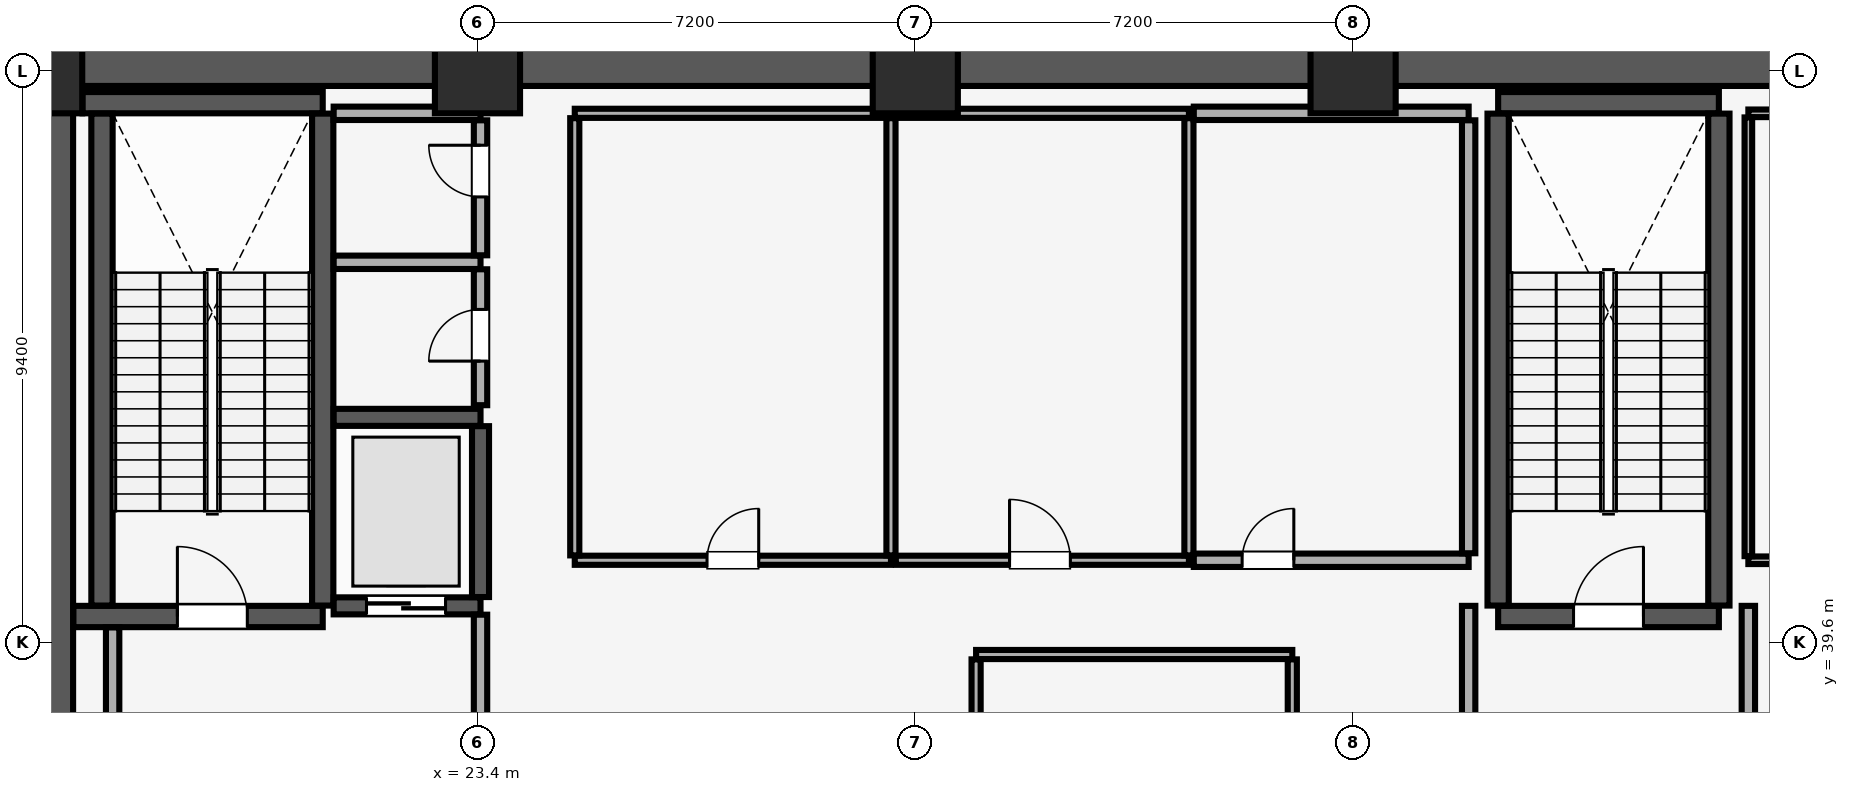
"""IFC4 building model, lengths in metres.
Left out: names, types, materials, properties, quantities, classifications, styles, units other than length and angle.
Written with IfcOpenShell. Run it as: python <this file> out.ifc"""

import sys

from ifc_helpers import new_model, si_unit, direction, frame, frame_2d, origin, origin_2d, place, context, subcontext, project, spatial, rectangle, extrude, element, fill, save


model = new_model("IFC4")
c1 = context("Model", 3, precision=1e-05, world=origin(), true_north=direction((0.0, 1.0)))
c2 = subcontext(c1, "Body", "Model", "MODEL_VIEW")
j1 = project(units=[si_unit("LENGTHUNIT", "METRE"), si_unit("PLANEANGLEUNIT", "RADIAN")], contexts=[c1])
p1 = place(None, origin())
s1 = spatial("IfcSite", under=j1, at=p1, CompositionType="ELEMENT")
p2 = place(p1, origin())
s2 = spatial("IfcBuilding", under=s1, at=p2, CompositionType="ELEMENT")
p3 = place(p2, frame((0.0, 0.0, 26.0)))
s3 = spatial("IfcBuildingStorey", under=s2, at=p3, CompositionType="ELEMENT", Elevation=26.0)
for number, where, z_axis, x_axis in (
    (1, (16.2, 49.0, 0.0), (0.0, 0.0, 1.0), (1.0, 0.0, 0.0)),
    (2, (23.4, 49.0, 0.0), (0.0, 0.0, 1.0), (1.0, 0.0, 0.0)),
    (3, (30.6, 49.0, 0.0), (0.0, 0.0, 1.0), (1.0, 0.0, 0.0)),
    (4, (37.8, 49.0, 0.0), (0.0, 0.0, 1.0), (1.0, 0.0, 0.0)),
):
    element("IfcColumn", number, at=place(p3, frame(where, z_axis=z_axis, x_axis=x_axis)), inside=s3, PredefinedType="COLUMN", context=c2, shape_type="SweptSolid", body=[
        extrude(rectangle(XDim=1.4, YDim=1.4, at=origin_2d()), origin(), (0.0, 0.0, 1.0), 5.16),
    ])
p4 = place(p3, frame((16.2, 49.3, 0.0), z_axis=(0.0, 0.0, 1.0), x_axis=(1.0, 0.0, 0.0)))
e5 = element("IfcWall", 5, at=p4, inside=s3, PredefinedType="SHEAR", context=c2, shape_type="SweptSolid", body=[
    extrude(rectangle(XDim=51.6, YDim=1.1, at=frame_2d((25.8, 0.0))), origin(), (0.0, 0.0, 1.0), 5.12),
])
p5 = place(p3, frame((16.2, 29.4, 0.0), z_axis=(0.0, 0.0, 1.0), x_axis=(0.0, 1.0, 0.0)))
e6 = element("IfcWall", 6, at=p5, inside=s3, PredefinedType="SHEAR", context=c2, shape_type="SweptSolid", body=[
    extrude(rectangle(XDim=19.2, YDim=1.1, at=frame_2d((9.6, 0.0))), origin(), (0.0, 0.0, 1.0), 5.12),
])
p6 = place(p3, frame((16.755, 40.025, 0.0), z_axis=(0.0, 0.0, 1.0), x_axis=(1.0, 0.0, 0.0)))
e7 = element("IfcWall", 7, at=p6, inside=s3, PredefinedType="SHEAR", context=c2, shape_type="SweptSolid", body=[
    extrude(rectangle(XDim=4.1, YDim=0.35, at=frame_2d((2.05, 0.0))), origin(), (0.0, 0.0, 1.0), 5.12),
])
p7 = place(p6, frame((1.71, 0.0, 0.0)))
e8 = element("IfcOpeningElement", 8, at=p7, cuts=e7, PredefinedType="OPENING", context=c2, shape_type="SweptSolid", body=[
    extrude(rectangle(XDim=1.15, YDim=2.15, at=frame_2d((0.575, 1.075))), frame((0.0, 0.185, 0.0), z_axis=(0.0, -1.0, 0.0), x_axis=(1.0, 0.0, 0.0)), (0.0, 0.0, 1.0), 0.37),
])
p8 = place(p3, frame((16.905, 48.475, 0.0), z_axis=(0.0, 0.0, 1.0), x_axis=(1.0, 0.0, 0.0)))
e9 = element("IfcWall", 9, at=p8, inside=s3, PredefinedType="SHEAR", context=c2, shape_type="SweptSolid", body=[
    extrude(rectangle(XDim=3.95, YDim=0.35, at=frame_2d((1.975, 0.0))), origin(), (0.0, 0.0, 1.0), 5.12),
])
for number, where, z_axis, x_axis in (
    (10, (17.225, 40.205, 0.0), (0.0, 0.0, 1.0), (0.0, 1.0, 0.0)),
    (11, (20.855, 40.205, 0.0), (0.0, 0.0, 1.0), (0.0, 1.0, 0.0)),
):
    element("IfcWall", number, at=place(p3, frame(where, z_axis=z_axis, x_axis=x_axis)), inside=s3, PredefinedType="SHEAR", context=c2, shape_type="SweptSolid", body=[
        extrude(rectangle(XDim=8.09, YDim=0.35, at=frame_2d((4.045, 0.0))), origin(), (0.0, 0.0, 1.0), 5.12),
    ])
p9 = place(p3, frame((40.185, 40.025, 0.0), z_axis=(0.0, 0.0, 1.0), x_axis=(1.0, 0.0, 0.0)))
e12 = element("IfcWall", 12, at=p9, inside=s3, PredefinedType="SHEAR", context=c2, shape_type="SweptSolid", body=[
    extrude(rectangle(XDim=3.63, YDim=0.35, at=frame_2d((1.815, 0.0))), origin(), (0.0, 0.0, 1.0), 5.12),
])
p10 = place(p9, frame((1.24, 0.0, 0.0)))
e13 = element("IfcOpeningElement", 13, at=p10, cuts=e12, PredefinedType="OPENING", context=c2, shape_type="SweptSolid", body=[
    extrude(rectangle(XDim=1.15, YDim=2.15, at=frame_2d((0.575, 1.075))), frame((0.0, 0.185, 0.0), z_axis=(0.0, -1.0, 0.0), x_axis=(1.0, 0.0, 0.0)), (0.0, 0.0, 1.0), 0.37),
])
p11 = place(p3, frame((40.185, 48.475, 0.0), z_axis=(0.0, 0.0, 1.0), x_axis=(1.0, 0.0, 0.0)))
e14 = element("IfcWall", 14, at=p11, inside=s3, PredefinedType="SHEAR", context=c2, shape_type="SweptSolid", body=[
    extrude(rectangle(XDim=3.63, YDim=0.35, at=frame_2d((1.815, 0.0))), origin(), (0.0, 0.0, 1.0), 5.12),
])
for number, where, z_axis, x_axis in (
    (15, (40.185, 40.205, 0.0), (0.0, 0.0, 1.0), (0.0, 1.0, 0.0)),
    (16, (43.815, 40.205, 0.0), (0.0, 0.0, 1.0), (0.0, 1.0, 0.0)),
):
    element("IfcWall", number, at=place(p3, frame(where, z_axis=z_axis, x_axis=x_axis)), inside=s3, PredefinedType="SHEAR", context=c2, shape_type="SweptSolid", body=[
        extrude(rectangle(XDim=8.09, YDim=0.35, at=frame_2d((4.045, 0.0))), origin(), (0.0, 0.0, 1.0), 5.12),
    ])
p12 = place(p3, frame((21.035, 40.2, 0.0), z_axis=(0.0, 0.0, 1.0), x_axis=(1.0, 0.0, 0.0)))
e17 = element("IfcWall", 17, at=p12, inside=s3, PredefinedType="SHEAR", context=c2, shape_type="SweptSolid", body=[
    extrude(rectangle(XDim=2.415, YDim=0.28, at=frame_2d((1.208, 0.0))), origin(), (0.0, 0.0, 1.0), 5.12),
])
p13 = place(p12, frame((0.54, 0.0, 0.0)))
e18 = element("IfcOpeningElement", 18, at=p13, cuts=e17, PredefinedType="OPENING", context=c2, shape_type="SweptSolid", body=[
    extrude(rectangle(XDim=1.3, YDim=2.3, at=frame_2d((0.65, 1.15))), frame((0.0, 0.15, 0.0), z_axis=(0.0, -1.0, 0.0), x_axis=(1.0, 0.0, 0.0)), (0.0, 0.0, 1.0), 0.3),
])
p14 = place(p3, frame((21.035, 43.3, 0.0), z_axis=(0.0, 0.0, 1.0), x_axis=(1.0, 0.0, 0.0)))
e19 = element("IfcWall", 19, at=p14, inside=s3, PredefinedType="SHEAR", context=c2, shape_type="SweptSolid", body=[
    extrude(rectangle(XDim=2.415, YDim=0.28, at=frame_2d((1.208, 0.0))), origin(), (0.0, 0.0, 1.0), 5.12),
])
p15 = place(p3, frame((23.45, 40.345, 0.0), z_axis=(0.0, 0.0, 1.0), x_axis=(0.0, 1.0, 0.0)))
e20 = element("IfcWall", 20, at=p15, inside=s3, PredefinedType="SHEAR", context=c2, shape_type="SweptSolid", body=[
    extrude(rectangle(XDim=2.81, YDim=0.28, at=frame_2d((1.405, 0.0))), origin(), (0.0, 0.0, 1.0), 5.12),
])
p16 = place(p3, frame((17.4, 34.415, 0.0), z_axis=(0.0, 0.0, 1.0), x_axis=(0.0, 1.0, 0.0)))
e21 = element("IfcWall", 21, at=p16, inside=s3, PredefinedType="PARTITIONING", context=c2, shape_type="SweptSolid", body=[
    extrude(rectangle(XDim=5.43, YDim=0.22, at=frame_2d((2.715, 0.0))), origin(), (0.0, 0.0, 1.0), 5.12),
])
p17 = place(p3, frame((23.45, 34.415, 0.0), z_axis=(0.0, 0.0, 1.0), x_axis=(0.0, 1.0, 0.0)))
e22 = element("IfcWall", 22, at=p17, inside=s3, PredefinedType="PARTITIONING", context=c2, shape_type="SweptSolid", body=[
    extrude(rectangle(XDim=5.64, YDim=0.22, at=frame_2d((2.82, 0.0))), origin(), (0.0, 0.0, 1.0), 5.12),
])
for number, where, z_axis, x_axis in (
    (23, (39.7, 34.415, 0.0), (0.0, 0.0, 1.0), (0.0, 1.0, 0.0)),
    (24, (44.3, 34.415, 0.0), (0.0, 0.0, 1.0), (0.0, 1.0, 0.0)),
):
    element("IfcWall", number, at=place(p3, frame(where, z_axis=z_axis, x_axis=x_axis)), inside=s3, PredefinedType="PARTITIONING", context=c2, shape_type="SweptSolid", body=[
        extrude(rectangle(XDim=5.785, YDim=0.22, at=frame_2d((2.893, 0.0))), origin(), (0.0, 0.0, 1.0), 5.12),
    ])
p18 = place(p3, frame((21.035, 45.85, 0.0), z_axis=(0.0, 0.0, 1.0), x_axis=(1.0, 0.0, 0.0)))
e25 = element("IfcWall", 25, at=p18, inside=s3, PredefinedType="PARTITIONING", context=c2, shape_type="SweptSolid", body=[
    extrude(rectangle(XDim=2.415, YDim=0.22, at=frame_2d((1.208, 0.0))), origin(), (0.0, 0.0, 1.0), 5.12),
])
p19 = place(p3, frame((23.45, 43.5, 0.0), z_axis=(0.0, 0.0, 1.0), x_axis=(0.0, 1.0, 0.0)))
e26 = element("IfcWall", 26, at=p19, inside=s3, PredefinedType="PARTITIONING", context=c2, shape_type="SweptSolid", body=[
    extrude(rectangle(XDim=2.235, YDim=0.22, at=frame_2d((1.118, 0.0))), origin(), (0.0, 0.0, 1.0), 5.12),
])
p20 = place(p19, frame((0.725, 0.0, 0.0)))
e27 = element("IfcOpeningElement", 27, at=p20, cuts=e26, PredefinedType="OPENING", context=c2, shape_type="SweptSolid", body=[
    extrude(rectangle(XDim=0.85, YDim=2.1, at=frame_2d((0.425, 1.05))), frame((0.0, 0.12, 0.0), z_axis=(0.0, -1.0, 0.0), x_axis=(1.0, 0.0, 0.0)), (0.0, 0.0, 1.0), 0.24),
])
p21 = place(p3, frame((21.035, 48.3, 0.0), z_axis=(0.0, 0.0, 1.0), x_axis=(1.0, 0.0, 0.0)))
e28 = element("IfcWall", 28, at=p21, inside=s3, PredefinedType="PARTITIONING", context=c2, shape_type="SweptSolid", body=[
    extrude(rectangle(XDim=2.415, YDim=0.22, at=frame_2d((1.208, 0.0))), origin(), (0.0, 0.0, 1.0), 5.12),
])
p22 = place(p3, frame((23.45, 45.965, 0.0), z_axis=(0.0, 0.0, 1.0), x_axis=(0.0, 1.0, 0.0)))
e29 = element("IfcWall", 29, at=p22, inside=s3, PredefinedType="PARTITIONING", context=c2, shape_type="SweptSolid", body=[
    extrude(rectangle(XDim=2.22, YDim=0.22, at=frame_2d((1.11, 0.0))), origin(), (0.0, 0.0, 1.0), 5.12),
])
p23 = place(p22, frame((0.96, 0.0, 0.0)))
e30 = element("IfcOpeningElement", 30, at=p23, cuts=e29, PredefinedType="OPENING", context=c2, shape_type="SweptSolid", body=[
    extrude(rectangle(XDim=0.85, YDim=2.1, at=frame_2d((0.425, 1.05))), frame((0.0, 0.12, 0.0), z_axis=(0.0, -1.0, 0.0), x_axis=(1.0, 0.0, 0.0)), (0.0, 0.0, 1.0), 0.24),
])
p24 = place(p3, frame((31.6, 39.4, 0.0), z_axis=(0.0, 0.0, 1.0), x_axis=(1.0, 0.0, 0.0)))
e31 = element("IfcWall", 31, at=p24, inside=s3, PredefinedType="PARTITIONING", context=c2, shape_type="SweptSolid", body=[
    extrude(rectangle(XDim=5.2, YDim=0.15, at=frame_2d((2.6, 0.0))), origin(), (0.0, 0.0, 1.0), 5.12),
])
for number, where, z_axis, x_axis in (
    (32, (31.6, 34.38, 0.0), (0.0, 0.0, 1.0), (0.0, 1.0, 0.0)),
    (33, (36.8, 34.38, 0.0), (0.0, 0.0, 1.0), (0.0, 1.0, 0.0)),
):
    element("IfcWall", number, at=place(p3, frame(where, z_axis=z_axis, x_axis=x_axis)), inside=s3, PredefinedType="PARTITIONING", context=c2, shape_type="SweptSolid", body=[
        extrude(rectangle(XDim=4.94, YDim=0.15, at=frame_2d((2.47, 0.0))), origin(), (0.0, 0.0, 1.0), 5.12),
    ])
p25 = place(p3, frame((25.0, 40.95, 0.0), z_axis=(0.0, 0.0, 1.0), x_axis=(1.0, 0.0, 0.0)))
e34 = element("IfcWall", 34, at=p25, inside=s3, PredefinedType="PARTITIONING", context=c2, shape_type="SweptSolid", body=[
    extrude(rectangle(XDim=5.2, YDim=0.15, at=frame_2d((2.6, 0.0))), origin(), (0.0, 0.0, 1.0), 5.12),
])
p26 = place(p25, frame((2.175, 0.0, 0.0)))
e35 = element("IfcOpeningElement", 35, at=p26, cuts=e34, PredefinedType="OPENING", context=c2, shape_type="SweptSolid", body=[
    extrude(rectangle(XDim=0.85, YDim=2.1, at=frame_2d((0.425, 1.05))), frame((0.0, 0.085, 0.0), z_axis=(0.0, -1.0, 0.0), x_axis=(1.0, 0.0, 0.0)), (0.0, 0.0, 1.0), 0.17),
])
p27 = place(p3, frame((25.0, 48.3, 0.0), z_axis=(0.0, 0.0, 1.0), x_axis=(1.0, 0.0, 0.0)))
e36 = element("IfcWall", 36, at=p27, inside=s3, PredefinedType="PARTITIONING", context=c2, shape_type="SweptSolid", body=[
    extrude(rectangle(XDim=5.2, YDim=0.15, at=frame_2d((2.6, 0.0))), origin(), (0.0, 0.0, 1.0), 5.12),
])
for number, where, z_axis, x_axis in (
    (37, (25.0, 41.03, 0.0), (0.0, 0.0, 1.0), (0.0, 1.0, 0.0)),
    (38, (30.2, 41.03, 0.0), (0.0, 0.0, 1.0), (0.0, 1.0, 0.0)),
):
    element("IfcWall", number, at=place(p3, frame(where, z_axis=z_axis, x_axis=x_axis)), inside=s3, PredefinedType="PARTITIONING", context=c2, shape_type="SweptSolid", body=[
        extrude(rectangle(XDim=7.19, YDim=0.15, at=frame_2d((3.595, 0.0))), origin(), (0.0, 0.0, 1.0), 5.12),
    ])
p28 = place(p3, frame((30.28, 40.95, 0.0), z_axis=(0.0, 0.0, 1.0), x_axis=(1.0, 0.0, 0.0)))
e39 = element("IfcWall", 39, at=p28, inside=s3, PredefinedType="PARTITIONING", context=c2, shape_type="SweptSolid", body=[
    extrude(rectangle(XDim=4.82, YDim=0.15, at=frame_2d((2.41, 0.0))), origin(), (0.0, 0.0, 1.0), 5.12),
])
p29 = place(p28, frame((1.87, 0.0, 0.0)))
e40 = element("IfcOpeningElement", 40, at=p29, cuts=e39, PredefinedType="OPENING", context=c2, shape_type="SweptSolid", body=[
    extrude(rectangle(XDim=1.0, YDim=2.15, at=frame_2d((0.5, 1.075))), frame((0.0, 0.085, 0.0), z_axis=(0.0, -1.0, 0.0), x_axis=(1.0, 0.0, 0.0)), (0.0, 0.0, 1.0), 0.17),
])
p30 = place(p3, frame((30.28, 48.3, 0.0), z_axis=(0.0, 0.0, 1.0), x_axis=(1.0, 0.0, 0.0)))
e41 = element("IfcWall", 41, at=p30, inside=s3, PredefinedType="PARTITIONING", context=c2, shape_type="SweptSolid", body=[
    extrude(rectangle(XDim=4.82, YDim=0.15, at=frame_2d((2.41, 0.0))), origin(), (0.0, 0.0, 1.0), 5.12),
])
p31 = place(p3, frame((35.1, 41.03, 0.0), z_axis=(0.0, 0.0, 1.0), x_axis=(0.0, 1.0, 0.0)))
e42 = element("IfcWall", 42, at=p31, inside=s3, PredefinedType="PARTITIONING", context=c2, shape_type="SweptSolid", body=[
    extrude(rectangle(XDim=7.19, YDim=0.15, at=frame_2d((3.595, 0.0))), origin(), (0.0, 0.0, 1.0), 5.12),
])
p32 = place(p3, frame((35.18, 40.95, 0.0), z_axis=(0.0, 0.0, 1.0), x_axis=(1.0, 0.0, 0.0)))
e43 = element("IfcWall", 43, at=p32, inside=s3, PredefinedType="PARTITIONING", context=c2, shape_type="SweptSolid", body=[
    extrude(rectangle(XDim=4.52, YDim=0.22, at=frame_2d((2.26, 0.0))), origin(), (0.0, 0.0, 1.0), 5.12),
])
p33 = place(p32, frame((0.795, 0.0, 0.0)))
e44 = element("IfcOpeningElement", 44, at=p33, cuts=e43, PredefinedType="OPENING", context=c2, shape_type="SweptSolid", body=[
    extrude(rectangle(XDim=0.85, YDim=2.1, at=frame_2d((0.425, 1.05))), frame((0.0, 0.12, 0.0), z_axis=(0.0, -1.0, 0.0), x_axis=(1.0, 0.0, 0.0)), (0.0, 0.0, 1.0), 0.24),
])
p34 = place(p3, frame((35.18, 48.3, 0.0), z_axis=(0.0, 0.0, 1.0), x_axis=(1.0, 0.0, 0.0)))
e45 = element("IfcWall", 45, at=p34, inside=s3, PredefinedType="PARTITIONING", context=c2, shape_type="SweptSolid", body=[
    extrude(rectangle(XDim=4.52, YDim=0.22, at=frame_2d((2.26, 0.0))), origin(), (0.0, 0.0, 1.0), 5.12),
])
p35 = place(p3, frame((39.7, 41.065, 0.0), z_axis=(0.0, 0.0, 1.0), x_axis=(0.0, 1.0, 0.0)))
e46 = element("IfcWall", 46, at=p35, inside=s3, PredefinedType="PARTITIONING", context=c2, shape_type="SweptSolid", body=[
    extrude(rectangle(XDim=7.12, YDim=0.22, at=frame_2d((3.56, 0.0))), origin(), (0.0, 0.0, 1.0), 5.12),
])
p36 = place(p3, frame((44.3, 40.95, 0.0), z_axis=(0.0, 0.0, 1.0), x_axis=(1.0, 0.0, 0.0)))
e47 = element("IfcWall", 47, at=p36, inside=s3, PredefinedType="PARTITIONING", context=c2, shape_type="SweptSolid", body=[
    extrude(rectangle(XDim=3.1, YDim=0.125, at=frame_2d((1.55, 0.0))), origin(), (0.0, 0.0, 1.0), 5.12),
])
p37 = place(p36, frame((1.1, 0.0, 0.0)))
e48 = element("IfcOpeningElement", 48, at=p37, cuts=e47, PredefinedType="OPENING", context=c2, shape_type="SweptSolid", body=[
    extrude(rectangle(XDim=0.9, YDim=2.1, at=frame_2d((0.45, 1.05))), frame((0.0, 0.073, 0.0), z_axis=(0.0, -1.0, 0.0), x_axis=(1.0, 0.0, 0.0)), (0.0, 0.0, 1.0), 0.145),
])
p38 = place(p3, frame((44.3, 48.3, 0.0), z_axis=(0.0, 0.0, 1.0), x_axis=(1.0, 0.0, 0.0)))
e49 = element("IfcWall", 49, at=p38, inside=s3, PredefinedType="PARTITIONING", context=c2, shape_type="SweptSolid", body=[
    extrude(rectangle(XDim=3.1, YDim=0.125, at=frame_2d((1.55, 0.0))), origin(), (0.0, 0.0, 1.0), 5.12),
])
p39 = place(p3, frame((44.3, 41.018, 0.0), z_axis=(0.0, 0.0, 1.0), x_axis=(0.0, 1.0, 0.0)))
e50 = element("IfcWall", 50, at=p39, inside=s3, PredefinedType="PARTITIONING", context=c2, shape_type="SweptSolid", body=[
    extrude(rectangle(XDim=7.215, YDim=0.125, at=frame_2d((3.607, 0.0))), origin(), (0.0, 0.0, 1.0), 5.12),
])
p40 = place(p7, origin())
e51 = element("IfcDoor", 51, at=p40, inside=s3, OperationType="SINGLE_SWING_LEFT", PredefinedType="DOOR", context=c2, shape_type="SweptSolid", body=[
    extrude(rectangle(XDim=1.15, YDim=2.15, at=frame_2d((0.575, 1.075))), frame((0.0, 0.025, 0.0), z_axis=(0.0, -1.0, 0.0), x_axis=(1.0, 0.0, 0.0)), (0.0, 0.0, 1.0), 0.05),
])
fill(e8, e51)
p41 = place(p10, origin())
e52 = element("IfcDoor", 52, at=p41, inside=s3, OperationType="SINGLE_SWING_RIGHT", PredefinedType="DOOR", context=c2, shape_type="SweptSolid", body=[
    extrude(rectangle(XDim=1.15, YDim=2.15, at=frame_2d((0.575, 1.075))), frame((0.0, 0.025, 0.0), z_axis=(0.0, -1.0, 0.0), x_axis=(1.0, 0.0, 0.0)), (0.0, 0.0, 1.0), 0.05),
])
fill(e13, e52)
p42 = place(p13, origin())
e53 = element("IfcDoor", 53, at=p42, inside=s3, OperationType="DOUBLE_DOOR_SLIDING", PredefinedType="DOOR", context=c2, shape_type="SweptSolid", body=[
    extrude(rectangle(XDim=1.3, YDim=2.3, at=frame_2d((0.65, 1.15))), frame((0.0, 0.025, 0.0), z_axis=(0.0, -1.0, 0.0), x_axis=(1.0, 0.0, 0.0)), (0.0, 0.0, 1.0), 0.05),
])
fill(e18, e53)
p43 = place(p20, origin())
e54 = element("IfcDoor", 54, at=p43, inside=s3, OperationType="SINGLE_SWING_LEFT", PredefinedType="DOOR", context=c2, shape_type="SweptSolid", body=[
    extrude(rectangle(XDim=0.85, YDim=2.1, at=frame_2d((0.425, 1.05))), frame((0.0, 0.025, 0.0), z_axis=(0.0, -1.0, 0.0), x_axis=(1.0, 0.0, 0.0)), (0.0, 0.0, 1.0), 0.05),
])
fill(e27, e54)
p44 = place(p23, origin())
e55 = element("IfcDoor", 55, at=p44, inside=s3, OperationType="SINGLE_SWING_RIGHT", PredefinedType="DOOR", context=c2, shape_type="SweptSolid", body=[
    extrude(rectangle(XDim=0.85, YDim=2.1, at=frame_2d((0.425, 1.05))), frame((0.0, 0.025, 0.0), z_axis=(0.0, -1.0, 0.0), x_axis=(1.0, 0.0, 0.0)), (0.0, 0.0, 1.0), 0.05),
])
fill(e30, e55)
p45 = place(p26, origin())
e56 = element("IfcDoor", 56, at=p45, inside=s3, OperationType="SINGLE_SWING_RIGHT", PredefinedType="DOOR", context=c2, shape_type="SweptSolid", body=[
    extrude(rectangle(XDim=0.85, YDim=2.1, at=frame_2d((0.425, 1.05))), frame((0.0, 0.025, 0.0), z_axis=(0.0, -1.0, 0.0), x_axis=(1.0, 0.0, 0.0)), (0.0, 0.0, 1.0), 0.05),
])
fill(e35, e56)
p46 = place(p29, origin())
e57 = element("IfcDoor", 57, at=p46, inside=s3, OperationType="SINGLE_SWING_LEFT", PredefinedType="DOOR", context=c2, shape_type="SweptSolid", body=[
    extrude(rectangle(XDim=1.0, YDim=2.15, at=frame_2d((0.5, 1.075))), frame((0.0, 0.025, 0.0), z_axis=(0.0, -1.0, 0.0), x_axis=(1.0, 0.0, 0.0)), (0.0, 0.0, 1.0), 0.05),
])
fill(e40, e57)
p47 = place(p33, origin())
e58 = element("IfcDoor", 58, at=p47, inside=s3, OperationType="SINGLE_SWING_RIGHT", PredefinedType="DOOR", context=c2, shape_type="SweptSolid", body=[
    extrude(rectangle(XDim=0.85, YDim=2.1, at=frame_2d((0.425, 1.05))), frame((0.0, 0.025, 0.0), z_axis=(0.0, -1.0, 0.0), x_axis=(1.0, 0.0, 0.0)), (0.0, 0.0, 1.0), 0.05),
])
fill(e44, e58)
save(model, sys.argv[1])
